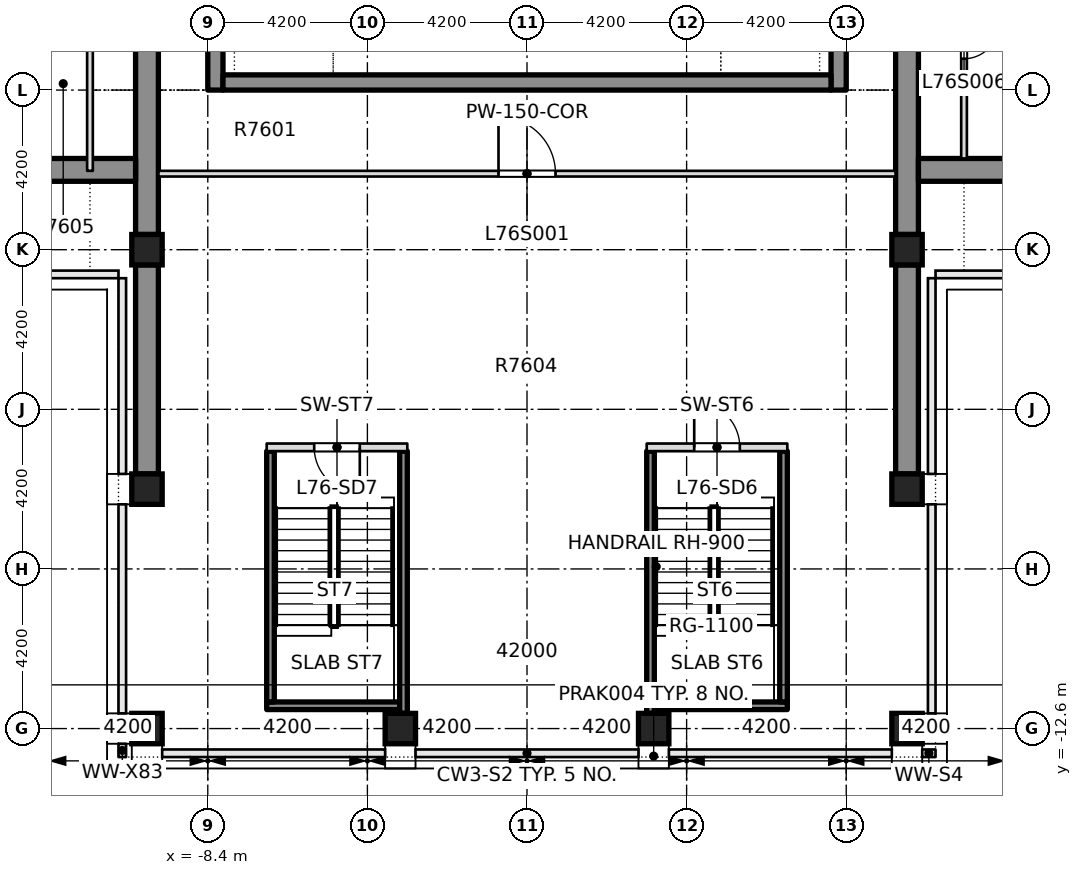
"""IFC4 building model, lengths in metres.
Left out: names, types, materials, properties, quantities, classifications, styles, units other than length and angle.
Written with IfcOpenShell. Run it as: python <this file> out.ifc"""

import sys

from ifc_helpers import new_model, si_unit, direction, frame, frame_2d, origin, origin_2d, place, context, subcontext, project, spatial, rectangle, extrude, element, fill, save


model = new_model("IFC4")
c1 = context("Model", 3, precision=1e-05, world=origin(), true_north=direction((0.0, 1.0)))
c2 = subcontext(c1, "Body", "Model", "MODEL_VIEW")
j1 = project(units=[si_unit("LENGTHUNIT", "METRE"), si_unit("PLANEANGLEUNIT", "RADIAN")], contexts=[c1])
p1 = place(None, origin())
s1 = spatial("IfcSite", under=j1, at=p1, CompositionType="ELEMENT")
p2 = place(p1, origin())
s2 = spatial("IfcBuilding", under=s1, at=p2, CompositionType="ELEMENT")
p3 = place(p2, frame((0.0, 0.0, 293.85)))
s3 = spatial("IfcBuildingStorey", under=s2, at=p3, CompositionType="ELEMENT", Elevation=293.85)
p4 = place(p3, frame((8.2, 4.2, -0.5), z_axis=(0.0, 0.0, 1.0), x_axis=(0.0, 1.0, 0.0)))
e1 = element("IfcWall", 1, at=p4, inside=s3, PredefinedType="SHEAR", context=c2, shape_type="SweptSolid", body=[
    extrude(rectangle(XDim=17.55, YDim=0.4, at=frame_2d((8.775, 0.0))), origin(), (0.0, 0.0, 1.0), 4.5),
])
p5 = place(p4, frame((6.7, 0.0, 0.5)))
e2 = element("IfcOpeningElement", 2, at=p5, cuts=e1, PredefinedType="OPENING", context=c2, shape_type="SweptSolid", body=[
    extrude(rectangle(XDim=1.2, YDim=2.1, at=frame_2d((0.6, 1.05))), frame((0.0, 0.21, 0.0), z_axis=(0.0, -1.0, 0.0), x_axis=(1.0, 0.0, 0.0)), (0.0, 0.0, 1.0), 0.42),
])
p6 = place(p3, frame((-8.2, 4.2, -0.5), z_axis=(0.0, 0.0, 1.0), x_axis=(0.0, 1.0, 0.0)))
e3 = element("IfcWall", 3, at=p6, inside=s3, PredefinedType="SHEAR", context=c2, shape_type="SweptSolid", body=[
    extrude(rectangle(XDim=17.55, YDim=0.4, at=frame_2d((8.775, 0.0))), origin(), (0.0, 0.0, 1.0), 4.5),
])
p7 = place(p6, frame((6.7, 0.0, 0.5)))
e4 = element("IfcOpeningElement", 4, at=p7, cuts=e3, PredefinedType="OPENING", context=c2, shape_type="SweptSolid", body=[
    extrude(rectangle(XDim=1.2, YDim=2.1, at=frame_2d((0.6, 1.05))), frame((0.0, 0.21, 0.0), z_axis=(0.0, -1.0, 0.0), x_axis=(1.0, 0.0, 0.0)), (0.0, 0.0, 1.0), 0.42),
])
p8 = place(p3, frame((-8.0, 4.4, -0.5), z_axis=(0.0, 0.0, 1.0), x_axis=(1.0, 0.0, 0.0)))
e5 = element("IfcWall", 5, at=p8, inside=s3, PredefinedType="SHEAR", context=c2, shape_type="SweptSolid", body=[
    extrude(rectangle(XDim=16.0, YDim=0.4, at=frame_2d((8.0, 0.0))), origin(), (0.0, 0.0, 1.0), 4.5),
])
for number, where, z_axis, x_axis in (
    (6, (-10.0, -12.6, -0.5), (0.0, 0.0, 1.0), (1.0, 0.0, 0.0)),
    (7, (-3.333, -12.6, -0.5), (0.0, 0.0, 1.0), (1.0, 0.0, 0.0)),
    (8, (3.333, -12.6, -0.5), (0.0, 0.0, 1.0), (1.0, 0.0, 0.0)),
    (9, (10.0, -12.6, -0.5), (0.0, 0.0, 1.0), (1.0, 0.0, 0.0)),
    (10, (-10.0, -6.3, -0.5), (0.0, 0.0, 1.0), (1.0, 0.0, 0.0)),
    (11, (10.0, -6.3, -0.5), (0.0, 0.0, 1.0), (1.0, 0.0, 0.0)),
    (12, (-10.0, 0.0, -0.5), (0.0, 0.0, 1.0), (1.0, 0.0, 0.0)),
    (13, (10.0, 0.0, -0.5), (0.0, 0.0, 1.0), (1.0, 0.0, 0.0)),
):
    element("IfcColumn", number, at=place(p3, frame(where, z_axis=z_axis, x_axis=x_axis)), inside=s3, PredefinedType="COLUMN", context=c2, shape_type="SweptSolid", body=[
        extrude(rectangle(XDim=0.8, YDim=0.8, at=origin_2d()), origin(), (0.0, 0.0, 1.0), 4.5),
    ])
for number, where, z_axis, x_axis in (
    (14, (-10.0, -5.9, 0.0), (0.0, 0.0, 1.0), (0.0, 1.0, 0.0)),
    (15, (10.0, -5.9, 0.0), (0.0, 0.0, 1.0), (0.0, 1.0, 0.0)),
):
    element("IfcWall", number, at=place(p3, frame(where, z_axis=z_axis, x_axis=x_axis)), inside=s3, PredefinedType="SHEAR", context=c2, shape_type="SweptSolid", body=[
        extrude(rectangle(XDim=5.5, YDim=0.6, at=frame_2d((2.75, 0.0))), origin(), (0.0, 0.0, 1.0), 4.0),
    ])
for number, where, z_axis, x_axis in (
    (16, (-10.0, 0.4, 0.0), (0.0, 0.0, 1.0), (0.0, 1.0, 0.0)),
    (17, (10.0, 0.4, 0.0), (0.0, 0.0, 1.0), (0.0, 1.0, 0.0)),
):
    element("IfcWall", number, at=place(p3, frame(where, z_axis=z_axis, x_axis=x_axis)), inside=s3, PredefinedType="SHEAR", context=c2, shape_type="SweptSolid", body=[
        extrude(rectangle(XDim=7.6, YDim=0.6, at=frame_2d((3.8, 0.0))), origin(), (0.0, 0.0, 1.0), 4.0),
    ])
for number, where, z_axis, x_axis in (
    (18, (10.3, 2.1, 0.0), (0.0, 0.0, 1.0), (1.0, 0.0, 0.0)),
    (19, (-14.0, 2.1, 0.0), (0.0, 0.0, 1.0), (1.0, 0.0, 0.0)),
):
    element("IfcWall", number, at=place(p3, frame(where, z_axis=z_axis, x_axis=x_axis)), inside=s3, PredefinedType="SHEAR", context=c2, shape_type="SweptSolid", body=[
        extrude(rectangle(XDim=3.7, YDim=0.6, at=frame_2d((1.85, 0.0))), origin(), (0.0, 0.0, 1.0), 4.0),
    ])
p9 = place(p3, frame((-9.699, 2.0, 0.0), z_axis=(0.0, 0.0, 1.0), x_axis=(1.0, 0.0, 0.0)))
e20 = element("IfcWall", 20, at=p9, inside=s3, PredefinedType="PARTITIONING", context=c2, shape_type="SweptSolid", body=[
    extrude(rectangle(XDim=19.398, YDim=0.15, at=frame_2d((9.699, 0.0))), origin(), (0.0, 0.0, 1.0), 4.0),
])
p10 = place(p9, frame((8.949, 0.0, 0.0)))
e21 = element("IfcOpeningElement", 21, at=p10, cuts=e20, PredefinedType="OPENING", context=c2, shape_type="SweptSolid", body=[
    extrude(rectangle(XDim=1.5, YDim=2.1, at=frame_2d((0.75, 1.05))), frame((0.0, 0.085, 0.0), z_axis=(0.0, -1.0, 0.0), x_axis=(1.0, 0.0, 0.0)), (0.0, 0.0, 1.0), 0.17),
])
p11 = place(p3, frame((11.5, 2.401, 0.0), z_axis=(0.0, 0.0, 1.0), x_axis=(0.0, 1.0, 0.0)))
e22 = element("IfcWall", 22, at=p11, inside=s3, PredefinedType="PARTITIONING", context=c2, shape_type="SweptSolid", body=[
    extrude(rectangle(XDim=3.598, YDim=0.15, at=frame_2d((1.799, 0.0))), origin(), (0.0, 0.0, 1.0), 4.0),
])
p12 = place(p11, frame((2.624, 0.0, 0.0)))
e23 = element("IfcOpeningElement", 23, at=p12, cuts=e22, PredefinedType="OPENING", context=c2, shape_type="SweptSolid", body=[
    extrude(rectangle(XDim=0.9, YDim=2.1, at=frame_2d((0.45, 1.05))), frame((0.0, 0.085, 0.0), z_axis=(0.0, -1.0, 0.0), x_axis=(1.0, 0.0, 0.0)), (0.0, 0.0, 1.0), 0.17),
])
p13 = place(p3, frame((-11.5, 2.075, 0.0), z_axis=(0.0, 0.0, 1.0), x_axis=(0.0, 1.0, 0.0)))
e24 = element("IfcWall", 24, at=p13, inside=s3, PredefinedType="PARTITIONING", context=c2, shape_type="SweptSolid", body=[
    extrude(rectangle(XDim=6.65, YDim=0.15, at=frame_2d((3.325, 0.0))), origin(), (0.0, 0.0, 1.0), 4.0),
])
p14 = place(p13, frame((4.588, 0.0, 0.0)))
e25 = element("IfcOpeningElement", 25, at=p14, cuts=e24, PredefinedType="OPENING", context=c2, shape_type="SweptSolid", body=[
    extrude(rectangle(XDim=1.1, YDim=2.1, at=frame_2d((0.55, 1.05))), frame((0.0, 0.085, 0.0), z_axis=(0.0, -1.0, 0.0), x_axis=(1.0, 0.0, 0.0)), (0.0, 0.0, 1.0), 0.17),
])
for number, where, z_axis, x_axis in (
    (26, (10.4, -13.25, 0.0), (0.0, 0.0, 1.0), (1.0, 0.0, 0.0)),
    (27, (-10.65, -13.0, 0.0), (0.0, 0.0, 1.0), (0.0, -1.0, 0.0)),
):
    element("IfcWall", number, at=place(p3, frame(where, z_axis=z_axis, x_axis=x_axis)), inside=s3, PredefinedType="STANDARD", context=c2, shape_type="SweptSolid", body=[
        extrude(rectangle(XDim=0.35, YDim=0.2, at=frame_2d((0.175, 0.0))), origin(), (0.0, 0.0, 1.0), 4.0),
    ])
p15 = place(p3, frame((3.15, -12.0, 0.0), z_axis=(0.0, 0.0, 1.0), x_axis=(1.0, 0.0, 0.0)))
e28 = element("IfcWall", 28, at=p15, inside=s3, PredefinedType="SOLIDWALL", context=c2, shape_type="SweptSolid", body=[
    extrude(rectangle(XDim=3.7, YDim=0.2, at=frame_2d((1.85, 0.0))), origin(), (0.0, 0.0, 1.0), 4.0),
])
p16 = place(p3, frame((3.15, -5.2, 0.0), z_axis=(0.0, 0.0, 1.0), x_axis=(1.0, 0.0, 0.0)))
e29 = element("IfcWall", 29, at=p16, inside=s3, PredefinedType="PARTITIONING", context=c2, shape_type="SweptSolid", body=[
    extrude(rectangle(XDim=3.7, YDim=0.2, at=frame_2d((1.85, 0.0))), origin(), (0.0, 0.0, 1.0), 4.0),
])
p17 = place(p16, frame((1.25, 0.0, 0.0)))
e30 = element("IfcOpeningElement", 30, at=p17, cuts=e29, PredefinedType="OPENING", context=c2, shape_type="SweptSolid", body=[
    extrude(rectangle(XDim=1.2, YDim=2.1, at=frame_2d((0.6, 1.05))), frame((0.0, 0.11, 0.0), z_axis=(0.0, -1.0, 0.0), x_axis=(1.0, 0.0, 0.0)), (0.0, 0.0, 1.0), 0.22),
])
p18 = place(p3, frame((3.25, -12.2, 0.0), z_axis=(0.0, 0.0, 1.0), x_axis=(0.0, 1.0, 0.0)))
e31 = element("IfcWall", 31, at=p18, inside=s3, PredefinedType="SOLIDWALL", context=c2, shape_type="SweptSolid", body=[
    extrude(rectangle(XDim=6.9, YDim=0.2, at=frame_2d((3.45, 0.0))), origin(), (0.0, 0.0, 1.0), 4.0),
])
p19 = place(p3, frame((6.75, -11.9, 0.0), z_axis=(0.0, 0.0, 1.0), x_axis=(0.0, 1.0, 0.0)))
e32 = element("IfcWall", 32, at=p19, inside=s3, PredefinedType="SOLIDWALL", context=c2, shape_type="SweptSolid", body=[
    extrude(rectangle(XDim=6.6, YDim=0.2, at=frame_2d((3.3, 0.0))), origin(), (0.0, 0.0, 1.0), 4.0),
])
p20 = place(p3, frame((-6.85, -12.0, 0.0), z_axis=(0.0, 0.0, 1.0), x_axis=(1.0, 0.0, 0.0)))
e33 = element("IfcWall", 33, at=p20, inside=s3, PredefinedType="SOLIDWALL", context=c2, shape_type="SweptSolid", body=[
    extrude(rectangle(XDim=3.7, YDim=0.2, at=frame_2d((1.85, 0.0))), origin(), (0.0, 0.0, 1.0), 4.0),
])
p21 = place(p3, frame((-6.85, -5.2, 0.0), z_axis=(0.0, 0.0, 1.0), x_axis=(1.0, 0.0, 0.0)))
e34 = element("IfcWall", 34, at=p21, inside=s3, PredefinedType="PARTITIONING", context=c2, shape_type="SweptSolid", body=[
    extrude(rectangle(XDim=3.7, YDim=0.2, at=frame_2d((1.85, 0.0))), origin(), (0.0, 0.0, 1.0), 4.0),
])
p22 = place(p21, frame((1.25, 0.0, 0.0)))
e35 = element("IfcOpeningElement", 35, at=p22, cuts=e34, PredefinedType="OPENING", context=c2, shape_type="SweptSolid", body=[
    extrude(rectangle(XDim=1.2, YDim=2.1, at=frame_2d((0.6, 1.05))), frame((0.0, 0.11, 0.0), z_axis=(0.0, -1.0, 0.0), x_axis=(1.0, 0.0, 0.0)), (0.0, 0.0, 1.0), 0.22),
])
p23 = place(p3, frame((-6.75, -11.9, 0.0), z_axis=(0.0, 0.0, 1.0), x_axis=(0.0, 1.0, 0.0)))
e36 = element("IfcWall", 36, at=p23, inside=s3, PredefinedType="SOLIDWALL", context=c2, shape_type="SweptSolid", body=[
    extrude(rectangle(XDim=6.6, YDim=0.2, at=frame_2d((3.3, 0.0))), origin(), (0.0, 0.0, 1.0), 4.0),
])
p24 = place(p3, frame((-3.25, -12.2, 0.0), z_axis=(0.0, 0.0, 1.0), x_axis=(0.0, 1.0, 0.0)))
e37 = element("IfcWall", 37, at=p24, inside=s3, PredefinedType="SOLIDWALL", context=c2, shape_type="SweptSolid", body=[
    extrude(rectangle(XDim=6.9, YDim=0.2, at=frame_2d((3.45, 0.0))), origin(), (0.0, 0.0, 1.0), 4.0),
])
p25 = place(p10, origin())
e38 = element("IfcDoor", 38, at=p25, inside=s3, OperationType="DOUBLE_DOOR_SINGLE_SWING", PredefinedType="DOOR", context=c2, shape_type="SweptSolid", body=[
    extrude(rectangle(XDim=1.5, YDim=2.1, at=frame_2d((0.75, 1.05))), frame((0.0, 0.025, 0.0), z_axis=(0.0, -1.0, 0.0), x_axis=(1.0, 0.0, 0.0)), (0.0, 0.0, 1.0), 0.05),
])
fill(e21, e38)
p26 = place(p12, origin())
e39 = element("IfcDoor", 39, at=p26, inside=s3, OperationType="SINGLE_SWING_LEFT", PredefinedType="DOOR", context=c2, shape_type="SweptSolid", body=[
    extrude(rectangle(XDim=0.9, YDim=2.1, at=frame_2d((0.45, 1.05))), frame((0.0, 0.025, 0.0), z_axis=(0.0, -1.0, 0.0), x_axis=(1.0, 0.0, 0.0)), (0.0, 0.0, 1.0), 0.05),
])
fill(e23, e39)
p27 = place(p17, origin())
e40 = element("IfcDoor", 40, at=p27, inside=s3, OperationType="SINGLE_SWING_LEFT", PredefinedType="DOOR", context=c2, shape_type="SweptSolid", body=[
    extrude(rectangle(XDim=1.2, YDim=2.1, at=frame_2d((0.6, 1.05))), frame((0.0, 0.025, 0.0), z_axis=(0.0, -1.0, 0.0), x_axis=(1.0, 0.0, 0.0)), (0.0, 0.0, 1.0), 0.05),
])
fill(e30, e40)
p28 = place(p22, origin())
e41 = element("IfcDoor", 41, at=p28, inside=s3, OperationType="SINGLE_SWING_LEFT", PredefinedType="DOOR", context=c2, shape_type="SweptSolid", body=[
    extrude(rectangle(XDim=1.2, YDim=2.1, at=frame_2d((0.6, 1.05))), frame((0.0, 0.025, 0.0), z_axis=(0.0, -1.0, 0.0), x_axis=(1.0, 0.0, 0.0)), (0.0, 0.0, 1.0), 0.05),
])
fill(e35, e41)
save(model, sys.argv[1])
